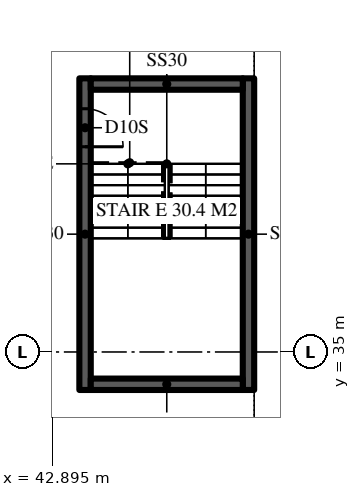
"""IFC4 building model, lengths in metres.
Left out: names, types, materials, properties, quantities, classifications, styles, units other than length and angle.
Written with IfcOpenShell. Run it as: python <this file> out.ifc"""

import sys

from ifc_helpers import new_model, si_unit, direction, frame, frame_2d, origin, place, context, subcontext, project, spatial, rectangle, extrude, element, fill, save


model = new_model("IFC4")
c1 = context("Model", 3, precision=1e-05, world=origin(), true_north=direction((0.0, 1.0)))
c2 = subcontext(c1, "Body", "Model", "MODEL_VIEW")
j1 = project(units=[si_unit("LENGTHUNIT", "METRE"), si_unit("PLANEANGLEUNIT", "RADIAN")], contexts=[c1])
p1 = place(None, origin())
s1 = spatial("IfcSite", under=j1, at=p1, CompositionType="ELEMENT")
p2 = place(p1, origin())
s2 = spatial("IfcBuilding", under=s1, at=p2, CompositionType="ELEMENT")
p3 = place(p2, frame((0.0, 0.0, -10.0)))
s3 = spatial("IfcBuildingStorey", under=s2, at=p3, CompositionType="ELEMENT", Elevation=-10.0)
p4 = place(p3, frame((48.5, -48.2, -0.5), z_axis=(0.0, 0.0, 1.0), x_axis=(0.0, 1.0, 0.0)))
e1 = element("IfcWall", 1, at=p4, inside=s3, PredefinedType="SOLIDWALL", context=c2, shape_type="SweptSolid", body=[
    extrude(rectangle(XDim=96.4, YDim=0.6, at=frame_2d((48.2, 0.0))), origin(), (0.0, 0.0, 1.0), 10.1),
])
p5 = place(p2, frame((0.0, 0.0, -5.0)))
s4 = spatial("IfcBuildingStorey", under=s2, at=p5, CompositionType="ELEMENT", Elevation=-5.0)
p6 = place(p5, frame((43.75, 42.2, 0.0), z_axis=(0.0, 0.0, 1.0), x_axis=(0.0, -1.0, 0.0)))
e2 = element("IfcWall", 2, at=p6, inside=s4, PredefinedType="SOLIDWALL", context=c2, shape_type="SweptSolid", body=[
    extrude(rectangle(XDim=8.2, YDim=0.3, at=frame_2d((4.1, 0.0))), origin(), (0.0, 0.0, 1.0), 4.6),
])
p7 = place(p6, frame((0.8, 0.0, 0.0)))
e3 = element("IfcOpeningElement", 3, at=p7, cuts=e2, PredefinedType="OPENING", context=c2, shape_type="SweptSolid", body=[
    extrude(rectangle(XDim=1.0, YDim=2.2, at=frame_2d((0.5, 1.1))), frame((0.0, 0.16, 0.0), z_axis=(0.0, -1.0, 0.0), x_axis=(1.0, 0.0, 0.0)), (0.0, 0.0, 1.0), 0.32),
])
p8 = place(p5, frame((48.05, 34.0, 0.0), z_axis=(0.0, 0.0, 1.0), x_axis=(0.0, 1.0, 0.0)))
e4 = element("IfcWall", 4, at=p8, inside=s4, PredefinedType="SOLIDWALL", context=c2, shape_type="SweptSolid", body=[
    extrude(rectangle(XDim=8.2, YDim=0.3, at=frame_2d((4.1, 0.0))), origin(), (0.0, 0.0, 1.0), 4.6),
])
for number, where, z_axis, x_axis in (
    (5, (43.9, 42.05, 0.0), (0.0, 0.0, 1.0), (1.0, 0.0, 0.0)),
    (6, (47.9, 34.15, 0.0), (0.0, 0.0, 1.0), (-1.0, 0.0, 0.0)),
):
    element("IfcWall", number, at=place(p5, frame(where, z_axis=z_axis, x_axis=x_axis)), inside=s4, PredefinedType="SOLIDWALL", context=c2, shape_type="SweptSolid", body=[
        extrude(rectangle(XDim=4.0, YDim=0.3, at=frame_2d((2.0, 0.0))), origin(), (0.0, 0.0, 1.0), 4.6),
    ])
p9 = place(p7, origin())
e7 = element("IfcDoor", 7, at=p9, inside=s4, OperationType="SINGLE_SWING_RIGHT", PredefinedType="DOOR", context=c2, shape_type="SweptSolid", body=[
    extrude(rectangle(XDim=1.0, YDim=2.2, at=frame_2d((0.5, 1.1))), frame((0.0, 0.025, 0.0), z_axis=(0.0, -1.0, 0.0), x_axis=(1.0, 0.0, 0.0)), (0.0, 0.0, 1.0), 0.05),
])
fill(e3, e7)
save(model, sys.argv[1])
